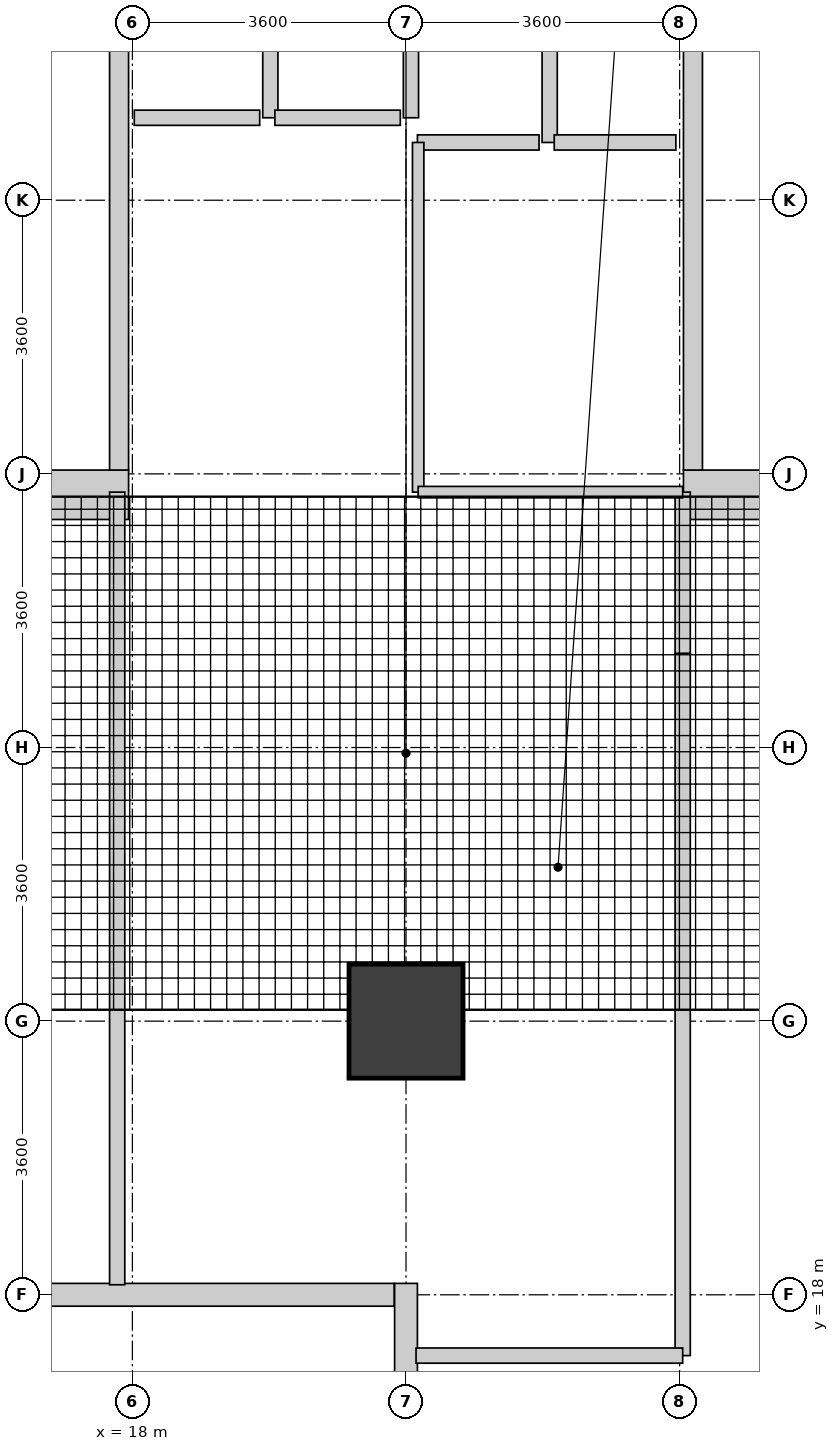
"""IFC4 building model, lengths in metres.
Left out: names, types, materials, properties, quantities, classifications, styles, units other than length and angle.
Written with IfcOpenShell. Run it as: python <this file> out.ifc"""

import sys

from ifc_helpers import new_model, si_unit, direction, frame, frame_2d, origin, origin_2d, place, context, subcontext, project, spatial, rectangle, extrude, source, transform, mapped, element, fill, save


model = new_model("IFC4")
c1 = context("Model", 3, precision=1e-05, world=origin(), true_north=direction((0.0, 1.0)))
c2 = subcontext(c1, "Body", "Model", "MODEL_VIEW")
j1 = project(units=[si_unit("LENGTHUNIT", "METRE"), si_unit("PLANEANGLEUNIT", "RADIAN")], contexts=[c1])
p1 = place(None, origin())
s1 = spatial("IfcSite", under=j1, at=p1, CompositionType="ELEMENT")
p2 = place(p1, origin())
s2 = spatial("IfcBuilding", under=s1, at=p2, CompositionType="ELEMENT")
p3 = place(p2, origin())
s3 = spatial("IfcBuildingStorey", under=s2, at=p3, CompositionType="ELEMENT", Elevation=0.0)
p4 = place(p3, frame((14.75, 28.525, 0.0), z_axis=(0.0, 0.0, 1.0), x_axis=(1.0, 0.0, 0.0)))
e1 = element("IfcWall", 1, at=p4, inside=s3, PredefinedType="SHEAR", context=c2, shape_type="SweptSolid", body=[
    extrude(rectangle(XDim=3.2, YDim=0.65, at=frame_2d((1.6, 0.0))), origin(), (0.0, 0.0, 1.0), 5.12),
])
p5 = place(p4, frame((0.85, 0.0, 0.0)))
e2 = element("IfcOpeningElement", 2, at=p5, cuts=e1, PredefinedType="OPENING", context=c2, shape_type="SweptSolid", body=[
    extrude(rectangle(XDim=1.1, YDim=2.08, at=frame_2d((0.55, 1.04))), frame((0.0, 0.335, 0.0), z_axis=(0.0, -1.0, 0.0), x_axis=(1.0, 0.0, 0.0)), (0.0, 0.0, 1.0), 0.67),
])
p6 = place(p3, frame((25.25, 28.525, 0.0), z_axis=(0.0, 0.0, 1.0), x_axis=(1.0, 0.0, 0.0)))
e3 = element("IfcWall", 3, at=p6, inside=s3, PredefinedType="SHEAR", context=c2, shape_type="SweptSolid", body=[
    extrude(rectangle(XDim=3.2, YDim=0.65, at=frame_2d((1.6, 0.0))), origin(), (0.0, 0.0, 1.0), 5.12),
])
p7 = place(p6, frame((0.35, 0.0, 0.0)))
e4 = element("IfcOpeningElement", 4, at=p7, cuts=e3, PredefinedType="OPENING", context=c2, shape_type="SweptSolid", body=[
    extrude(rectangle(XDim=1.1, YDim=2.08, at=frame_2d((0.55, 1.04))), frame((0.0, 0.335, 0.0), z_axis=(0.0, -1.0, 0.0), x_axis=(1.0, 0.0, 0.0)), (0.0, 0.0, 1.0), 0.67),
])
p8 = place(p3, frame((17.825, 28.85, 0.0), z_axis=(0.0, 0.0, 1.0), x_axis=(0.0, 1.0, 0.0)))
e5 = element("IfcWall", 5, at=p8, inside=s3, PredefinedType="SHEAR", context=c2, shape_type="SweptSolid", body=[
    extrude(rectangle(XDim=7.0, YDim=0.25, at=frame_2d((3.5, 0.0))), origin(), (0.0, 0.0, 1.0), 5.12),
])
p9 = place(p8, frame((0.15, 0.0, 0.0)))
e6 = element("IfcOpeningElement", 6, at=p9, cuts=e5, PredefinedType="OPENING", context=c2, shape_type="SweptSolid", body=[
    extrude(rectangle(XDim=1.1, YDim=2.08, at=frame_2d((0.55, 1.04))), frame((0.0, 0.135, 0.0), z_axis=(0.0, -1.0, 0.0), x_axis=(1.0, 0.0, 0.0)), (0.0, 0.0, 1.0), 0.27),
])
p10 = place(p3, frame((25.375, 28.85, 0.0), z_axis=(0.0, 0.0, 1.0), x_axis=(0.0, 1.0, 0.0)))
e7 = element("IfcWall", 7, at=p10, inside=s3, PredefinedType="SHEAR", context=c2, shape_type="SweptSolid", body=[
    extrude(rectangle(XDim=7.0, YDim=0.25, at=frame_2d((3.5, 0.0))), origin(), (0.0, 0.0, 1.0), 5.12),
])
p11 = place(p10, frame((0.15, 0.0, 0.0)))
e8 = element("IfcOpeningElement", 8, at=p11, cuts=e7, PredefinedType="OPENING", context=c2, shape_type="SweptSolid", body=[
    extrude(rectangle(XDim=1.1, YDim=2.08, at=frame_2d((0.55, 1.04))), frame((0.0, 0.135, 0.0), z_axis=(0.0, -1.0, 0.0), x_axis=(1.0, 0.0, 0.0)), (0.0, 0.0, 1.0), 0.27),
])
m1 = source(origin(), c2, "Body", "SweptSolid", [
    extrude(rectangle(XDim=1.5, YDim=1.5, at=origin_2d()), origin(), (0.0, 0.0, 1.0), 5.4),
])
p12 = place(p3, frame((21.6, 21.6, 0.0), z_axis=(0.0, 0.0, 1.0), x_axis=(1.0, 0.0, 0.0)))
e9 = element("IfcColumn", 9, at=p12, inside=s3, PredefinedType="COLUMN", context=c2, shape_type="MappedRepresentation", body=[
    mapped(m1, transform((0.0, 0.0, 0.0), x_axis=(1.0, 0.0, 0.0), y_axis=(0.0, 1.0, 0.0), z_axis=(0.0, 0.0, 1.0), scale=1.0)),
])
p13 = place(p3, frame((21.445, 18.0, 0.0), z_axis=(0.0, 0.0, 1.0), x_axis=(-1.0, 0.0, 0.0)))
e10 = element("IfcWall", 10, at=p13, inside=s3, PredefinedType="STANDARD", context=c2, shape_type="SweptSolid", body=[
    extrude(rectangle(XDim=20.294, YDim=0.3, at=frame_2d((10.147, 0.0))), origin(), (0.0, 0.0, 1.0), 5.1),
])
p14 = place(p13, frame((4.02, 0.0, 0.0)))
e11 = element("IfcOpeningElement", 11, at=p14, cuts=e10, PredefinedType="OPENING", context=c2, shape_type="SweptSolid", body=[
    extrude(rectangle(XDim=1.85, YDim=2.25, at=frame_2d((0.925, 1.125))), frame((0.0, 0.16, 0.0), z_axis=(0.0, -1.0, 0.0), x_axis=(1.0, 0.0, 0.0)), (0.0, 0.0, 1.0), 0.32),
])
p15 = place(p13, frame((1.12, 0.0, 0.0)))
e12 = element("IfcOpeningElement", 12, at=p15, cuts=e10, PredefinedType="OPENING", context=c2, shape_type="SweptSolid", body=[
    extrude(rectangle(XDim=1.95, YDim=2.4, at=frame_2d((0.975, 1.2))), frame((0.0, 0.16, 0.0), z_axis=(0.0, -1.0, 0.0), x_axis=(1.0, 0.0, 0.0)), (0.0, 0.0, 1.0), 0.32),
])
p16 = place(p13, frame((7.256, 0.0, 0.9)))
e13 = element("IfcOpeningElement", 13, at=p16, cuts=e10, PredefinedType="OPENING", context=c2, shape_type="SweptSolid", body=[
    extrude(rectangle(XDim=2.4, YDim=2.5, at=frame_2d((1.2, 1.25))), frame((0.0, 0.16, 0.0), z_axis=(0.0, -1.0, 0.0), x_axis=(1.0, 0.0, 0.0)), (0.0, 0.0, 1.0), 0.32),
])
p17 = place(p13, frame((14.021, 0.0, 0.9)))
e14 = element("IfcOpeningElement", 14, at=p17, cuts=e10, PredefinedType="OPENING", context=c2, shape_type="SweptSolid", body=[
    extrude(rectangle(XDim=2.4, YDim=2.5, at=frame_2d((1.2, 1.25))), frame((0.0, 0.16, 0.0), z_axis=(0.0, -1.0, 0.0), x_axis=(1.0, 0.0, 0.0)), (0.0, 0.0, 1.0), 0.32),
])
p18 = place(p13, frame((17.403, 0.0, 0.9)))
e15 = element("IfcOpeningElement", 15, at=p18, cuts=e10, PredefinedType="OPENING", context=c2, shape_type="SweptSolid", body=[
    extrude(rectangle(XDim=2.4, YDim=2.5, at=frame_2d((1.2, 1.25))), frame((0.0, 0.16, 0.0), z_axis=(0.0, -1.0, 0.0), x_axis=(1.0, 0.0, 0.0)), (0.0, 0.0, 1.0), 0.32),
])
p19 = place(p3, frame((21.6, 1.65, 0.0), z_axis=(0.0, 0.0, 1.0), x_axis=(0.0, 1.0, 0.0)))
e16 = element("IfcWall", 16, at=p19, inside=s3, PredefinedType="STANDARD", context=c2, shape_type="SweptSolid", body=[
    extrude(rectangle(XDim=16.5, YDim=0.3, at=frame_2d((8.25, 0.0))), origin(), (0.0, 0.0, 1.0), 5.1),
])
p20 = place(p19, frame((13.125, 0.0, 0.0)))
e17 = element("IfcOpeningElement", 17, at=p20, cuts=e16, PredefinedType="OPENING", context=c2, shape_type="SweptSolid", body=[
    extrude(rectangle(XDim=1.85, YDim=2.25, at=frame_2d((0.925, 1.125))), frame((0.0, 0.16, 0.0), z_axis=(0.0, -1.0, 0.0), x_axis=(1.0, 0.0, 0.0)), (0.0, 0.0, 1.0), 0.32),
])
p21 = place(p19, frame((0.45, 0.0, 0.9)))
e18 = element("IfcOpeningElement", 18, at=p21, cuts=e16, PredefinedType="OPENING", context=c2, shape_type="SweptSolid", body=[
    extrude(rectangle(XDim=2.4, YDim=2.5, at=frame_2d((1.2, 1.25))), frame((0.0, 0.16, 0.0), z_axis=(0.0, -1.0, 0.0), x_axis=(1.0, 0.0, 0.0)), (0.0, 0.0, 1.0), 0.32),
])
p22 = place(p19, frame((7.05, 0.0, 0.9)))
e19 = element("IfcOpeningElement", 19, at=p22, cuts=e16, PredefinedType="OPENING", context=c2, shape_type="SweptSolid", body=[
    extrude(rectangle(XDim=2.4, YDim=2.5, at=frame_2d((1.2, 1.25))), frame((0.0, 0.16, 0.0), z_axis=(0.0, -1.0, 0.0), x_axis=(1.0, 0.0, 0.0)), (0.0, 0.0, 1.0), 0.32),
])
p23 = place(p3, frame((18.025, 33.485, 0.0), z_axis=(0.0, 0.0, 1.0), x_axis=(1.0, 0.0, 0.0)))
e20 = element("IfcWall", 20, at=p23, inside=s3, PredefinedType="PARTITIONING", context=c2, shape_type="SweptSolid", body=[
    extrude(rectangle(XDim=1.65, YDim=0.2, at=frame_2d((0.825, 0.0))), origin(), (0.0, 0.0, 1.0), 5.1),
])
p24 = place(p23, frame((0.275, 0.0, 0.0)))
e21 = element("IfcOpeningElement", 21, at=p24, cuts=e20, PredefinedType="OPENING", context=c2, shape_type="SweptSolid", body=[
    extrude(rectangle(XDim=1.1, YDim=2.12, at=frame_2d((0.55, 1.06))), frame((0.0, 0.11, 0.0), z_axis=(0.0, -1.0, 0.0), x_axis=(1.0, 0.0, 0.0)), (0.0, 0.0, 1.0), 0.22),
])
p25 = place(p3, frame((19.815, 33.485, 0.0), z_axis=(0.0, 0.0, 1.0), x_axis=(0.0, 1.0, 0.0)))
e22 = element("IfcWall", 22, at=p25, inside=s3, PredefinedType="PARTITIONING", context=c2, shape_type="SweptSolid", body=[
    extrude(rectangle(XDim=2.23, YDim=0.2, at=frame_2d((1.115, 0.0))), origin(), (0.0, 0.0, 1.0), 5.1),
])
p26 = place(p3, frame((19.875, 33.485, 0.0), z_axis=(0.0, 0.0, 1.0), x_axis=(1.0, 0.0, 0.0)))
e23 = element("IfcWall", 23, at=p26, inside=s3, PredefinedType="PARTITIONING", context=c2, shape_type="SweptSolid", body=[
    extrude(rectangle(XDim=1.65, YDim=0.2, at=frame_2d((0.825, 0.0))), origin(), (0.0, 0.0, 1.0), 5.1),
])
p27 = place(p26, frame((0.275, 0.0, 0.0)))
e24 = element("IfcOpeningElement", 24, at=p27, cuts=e23, PredefinedType="OPENING", context=c2, shape_type="SweptSolid", body=[
    extrude(rectangle(XDim=1.1, YDim=2.12, at=frame_2d((0.55, 1.06))), frame((0.0, 0.11, 0.0), z_axis=(0.0, -1.0, 0.0), x_axis=(1.0, 0.0, 0.0)), (0.0, 0.0, 1.0), 0.22),
])
p28 = place(p3, frame((21.665, 33.485, 0.0), z_axis=(0.0, 0.0, 1.0), x_axis=(0.0, 1.0, 0.0)))
e25 = element("IfcWall", 25, at=p28, inside=s3, PredefinedType="PARTITIONING", context=c2, shape_type="SweptSolid", body=[
    extrude(rectangle(XDim=2.23, YDim=0.2, at=frame_2d((1.115, 0.0))), origin(), (0.0, 0.0, 1.0), 5.1),
])
p29 = place(p3, frame((21.75, 33.16, 0.0), z_axis=(0.0, 0.0, 1.0), x_axis=(1.0, 0.0, 0.0)))
e26 = element("IfcWall", 26, at=p29, inside=s3, PredefinedType="PARTITIONING", context=c2, shape_type="SweptSolid", body=[
    extrude(rectangle(XDim=1.6, YDim=0.2, at=frame_2d((0.8, 0.0))), origin(), (0.0, 0.0, 1.0), 5.1),
])
p30 = place(p29, frame((0.2, 0.0, 0.0)))
e27 = element("IfcOpeningElement", 27, at=p30, cuts=e26, PredefinedType="OPENING", context=c2, shape_type="SweptSolid", body=[
    extrude(rectangle(XDim=1.2, YDim=2.12, at=frame_2d((0.6, 1.06))), frame((0.0, 0.11, 0.0), z_axis=(0.0, -1.0, 0.0), x_axis=(1.0, 0.0, 0.0)), (0.0, 0.0, 1.0), 0.22),
])
p31 = place(p3, frame((23.49, 33.16, 0.0), z_axis=(0.0, 0.0, 1.0), x_axis=(0.0, 1.0, 0.0)))
e28 = element("IfcWall", 28, at=p31, inside=s3, PredefinedType="PARTITIONING", context=c2, shape_type="SweptSolid", body=[
    extrude(rectangle(XDim=2.68, YDim=0.2, at=frame_2d((1.34, 0.0))), origin(), (0.0, 0.0, 1.0), 5.1),
])
p32 = place(p3, frame((23.55, 33.16, 0.0), z_axis=(0.0, 0.0, 1.0), x_axis=(1.0, 0.0, 0.0)))
e29 = element("IfcWall", 29, at=p32, inside=s3, PredefinedType="PARTITIONING", context=c2, shape_type="SweptSolid", body=[
    extrude(rectangle(XDim=1.6, YDim=0.2, at=frame_2d((0.8, 0.0))), origin(), (0.0, 0.0, 1.0), 5.1),
])
p33 = place(p32, frame((0.2, 0.0, 0.0)))
e30 = element("IfcOpeningElement", 30, at=p33, cuts=e29, PredefinedType="OPENING", context=c2, shape_type="SweptSolid", body=[
    extrude(rectangle(XDim=1.2, YDim=2.12, at=frame_2d((0.6, 1.06))), frame((0.0, 0.11, 0.0), z_axis=(0.0, -1.0, 0.0), x_axis=(1.0, 0.0, 0.0)), (0.0, 0.0, 1.0), 0.22),
])
p34 = place(p3, frame((17.8, 18.132, 0.0), z_axis=(0.0, 0.0, 1.0), x_axis=(0.0, 1.0, 0.0)))
e31 = element("IfcWall", 31, at=p34, inside=s3, PredefinedType="PARTITIONING", context=c2, shape_type="SweptSolid", body=[
    extrude(rectangle(XDim=10.428, YDim=0.2, at=frame_2d((5.214, 0.0))), origin(), (0.0, 0.0, 1.0), 5.1),
])
p35 = place(p3, frame((25.24, 17.2, 0.0), z_axis=(0.0, 0.0, 1.0), x_axis=(0.0, 1.0, 0.0)))
e32 = element("IfcWall", 32, at=p35, inside=s3, PredefinedType="PARTITIONING", context=c2, shape_type="SweptSolid", body=[
    extrude(rectangle(XDim=9.24, YDim=0.2, at=frame_2d((4.62, 0.0))), origin(), (0.0, 0.0, 1.0), 5.1),
])
p36 = place(p3, frame((21.732, 17.2, 0.0), z_axis=(0.0, 0.0, 1.0), x_axis=(1.0, 0.0, 0.0)))
e33 = element("IfcWall", 33, at=p36, inside=s3, PredefinedType="PARTITIONING", context=c2, shape_type="SweptSolid", body=[
    extrude(rectangle(XDim=3.508, YDim=0.2, at=frame_2d((1.754, 0.0))), origin(), (0.0, 0.0, 1.0), 5.1),
])
p37 = place(p3, frame((25.24, 26.44, 0.0), z_axis=(0.0, 0.0, 1.0), x_axis=(0.0, 1.0, 0.0)))
e34 = element("IfcWall", 34, at=p37, inside=s3, PredefinedType="PARTITIONING", context=c2, shape_type="SweptSolid", body=[
    extrude(rectangle(XDim=2.12, YDim=0.2, at=frame_2d((1.06, 0.0))), origin(), (0.0, 0.0, 1.0), 5.1),
])
p38 = place(p3, frame((21.76, 28.56, 0.0), z_axis=(0.0, 0.0, 1.0), x_axis=(0.0, 1.0, 0.0)))
e35 = element("IfcWall", 35, at=p38, inside=s3, PredefinedType="PARTITIONING", context=c2, shape_type="SweptSolid", body=[
    extrude(rectangle(XDim=4.6, YDim=0.15, at=frame_2d((2.3, 0.0))), origin(), (0.0, 0.0, 1.0), 5.1),
])
p39 = place(p38, frame((1.55, 0.0, 0.0)))
e36 = element("IfcOpeningElement", 36, at=p39, cuts=e35, PredefinedType="OPENING", context=c2, shape_type="SweptSolid", body=[
    extrude(rectangle(XDim=1.5, YDim=2.1, at=frame_2d((0.75, 1.05))), frame((0.0, 0.085, 0.0), z_axis=(0.0, -1.0, 0.0), x_axis=(1.0, 0.0, 0.0)), (0.0, 0.0, 1.0), 0.17),
])
p40 = place(p3, frame((21.76, 28.56, 0.0), z_axis=(0.0, 0.0, 1.0), x_axis=(1.0, 0.0, 0.0)))
e37 = element("IfcWall", 37, at=p40, inside=s3, PredefinedType="PARTITIONING", context=c2, shape_type="SweptSolid", body=[
    extrude(rectangle(XDim=3.48, YDim=0.15, at=frame_2d((1.74, 0.0))), origin(), (0.0, 0.0, 1.0), 3.9),
])
p41 = place(p14, origin())
e38 = element("IfcDoor", 38, at=p41, inside=s3, OperationType="DOUBLE_DOOR_SINGLE_SWING", PredefinedType="DOOR", context=c2, shape_type="SweptSolid", body=[
    extrude(rectangle(XDim=1.85, YDim=2.25, at=frame_2d((0.925, 1.125))), frame((0.0, 0.025, 0.0), z_axis=(0.0, -1.0, 0.0), x_axis=(1.0, 0.0, 0.0)), (0.0, 0.0, 1.0), 0.05),
])
fill(e11, e38)
p42 = place(p15, origin())
e39 = element("IfcDoor", 39, at=p42, inside=s3, OperationType="DOUBLE_DOOR_SINGLE_SWING", PredefinedType="DOOR", context=c2, shape_type="SweptSolid", body=[
    extrude(rectangle(XDim=1.95, YDim=2.4, at=frame_2d((0.975, 1.2))), frame((0.0, 0.025, 0.0), z_axis=(0.0, -1.0, 0.0), x_axis=(1.0, 0.0, 0.0)), (0.0, 0.0, 1.0), 0.05),
])
fill(e12, e39)
p43 = place(p9, origin())
e40 = element("IfcDoor", 40, at=p43, inside=s3, OperationType="SINGLE_SWING_RIGHT", PredefinedType="DOOR", context=c2, shape_type="SweptSolid", body=[
    extrude(rectangle(XDim=1.1, YDim=2.08, at=frame_2d((0.55, 1.04))), frame((0.0, 0.025, 0.0), z_axis=(0.0, -1.0, 0.0), x_axis=(1.0, 0.0, 0.0)), (0.0, 0.0, 1.0), 0.05),
])
fill(e6, e40)
p44 = place(p11, origin())
e41 = element("IfcDoor", 41, at=p44, inside=s3, OperationType="SINGLE_SWING_LEFT", PredefinedType="DOOR", context=c2, shape_type="SweptSolid", body=[
    extrude(rectangle(XDim=1.1, YDim=2.08, at=frame_2d((0.55, 1.04))), frame((0.0, 0.025, 0.0), z_axis=(0.0, -1.0, 0.0), x_axis=(1.0, 0.0, 0.0)), (0.0, 0.0, 1.0), 0.05),
])
fill(e8, e41)
p45 = place(p7, origin())
e42 = element("IfcDoor", 42, at=p45, inside=s3, OperationType="SINGLE_SWING_RIGHT", PredefinedType="DOOR", context=c2, shape_type="SweptSolid", body=[
    extrude(rectangle(XDim=1.1, YDim=2.08, at=frame_2d((0.55, 1.04))), frame((0.0, 0.025, 0.0), z_axis=(0.0, -1.0, 0.0), x_axis=(1.0, 0.0, 0.0)), (0.0, 0.0, 1.0), 0.05),
])
fill(e4, e42)
p46 = place(p24, origin())
e43 = element("IfcDoor", 43, at=p46, inside=s3, OperationType="SLIDING_TO_LEFT", PredefinedType="DOOR", context=c2, shape_type="SweptSolid", body=[
    extrude(rectangle(XDim=1.1, YDim=2.12, at=frame_2d((0.55, 1.06))), frame((0.0, 0.025, 0.0), z_axis=(0.0, -1.0, 0.0), x_axis=(1.0, 0.0, 0.0)), (0.0, 0.0, 1.0), 0.05),
])
fill(e21, e43)
p47 = place(p27, origin())
e44 = element("IfcDoor", 44, at=p47, inside=s3, OperationType="SLIDING_TO_LEFT", PredefinedType="DOOR", context=c2, shape_type="SweptSolid", body=[
    extrude(rectangle(XDim=1.1, YDim=2.12, at=frame_2d((0.55, 1.06))), frame((0.0, 0.025, 0.0), z_axis=(0.0, -1.0, 0.0), x_axis=(1.0, 0.0, 0.0)), (0.0, 0.0, 1.0), 0.05),
])
fill(e24, e44)
p48 = place(p30, origin())
e45 = element("IfcDoor", 45, at=p48, inside=s3, OperationType="SLIDING_TO_RIGHT", PredefinedType="DOOR", context=c2, shape_type="SweptSolid", body=[
    extrude(rectangle(XDim=1.2, YDim=2.12, at=frame_2d((0.6, 1.06))), frame((0.0, 0.025, 0.0), z_axis=(0.0, -1.0, 0.0), x_axis=(1.0, 0.0, 0.0)), (0.0, 0.0, 1.0), 0.05),
])
fill(e27, e45)
p49 = place(p33, origin())
e46 = element("IfcDoor", 46, at=p49, inside=s3, OperationType="SLIDING_TO_RIGHT", PredefinedType="DOOR", context=c2, shape_type="SweptSolid", body=[
    extrude(rectangle(XDim=1.2, YDim=2.12, at=frame_2d((0.6, 1.06))), frame((0.0, 0.025, 0.0), z_axis=(0.0, -1.0, 0.0), x_axis=(1.0, 0.0, 0.0)), (0.0, 0.0, 1.0), 0.05),
])
fill(e30, e46)
p50 = place(p39, origin())
e47 = element("IfcDoor", 47, at=p50, inside=s3, OperationType="DOUBLE_DOOR_SINGLE_SWING", PredefinedType="DOOR", context=c2, shape_type="SweptSolid", body=[
    extrude(rectangle(XDim=1.5, YDim=2.1, at=frame_2d((0.75, 1.05))), frame((0.0, 0.025, 0.0), z_axis=(0.0, -1.0, 0.0), x_axis=(1.0, 0.0, 0.0)), (0.0, 0.0, 1.0), 0.05),
])
fill(e36, e47)
save(model, sys.argv[1])
